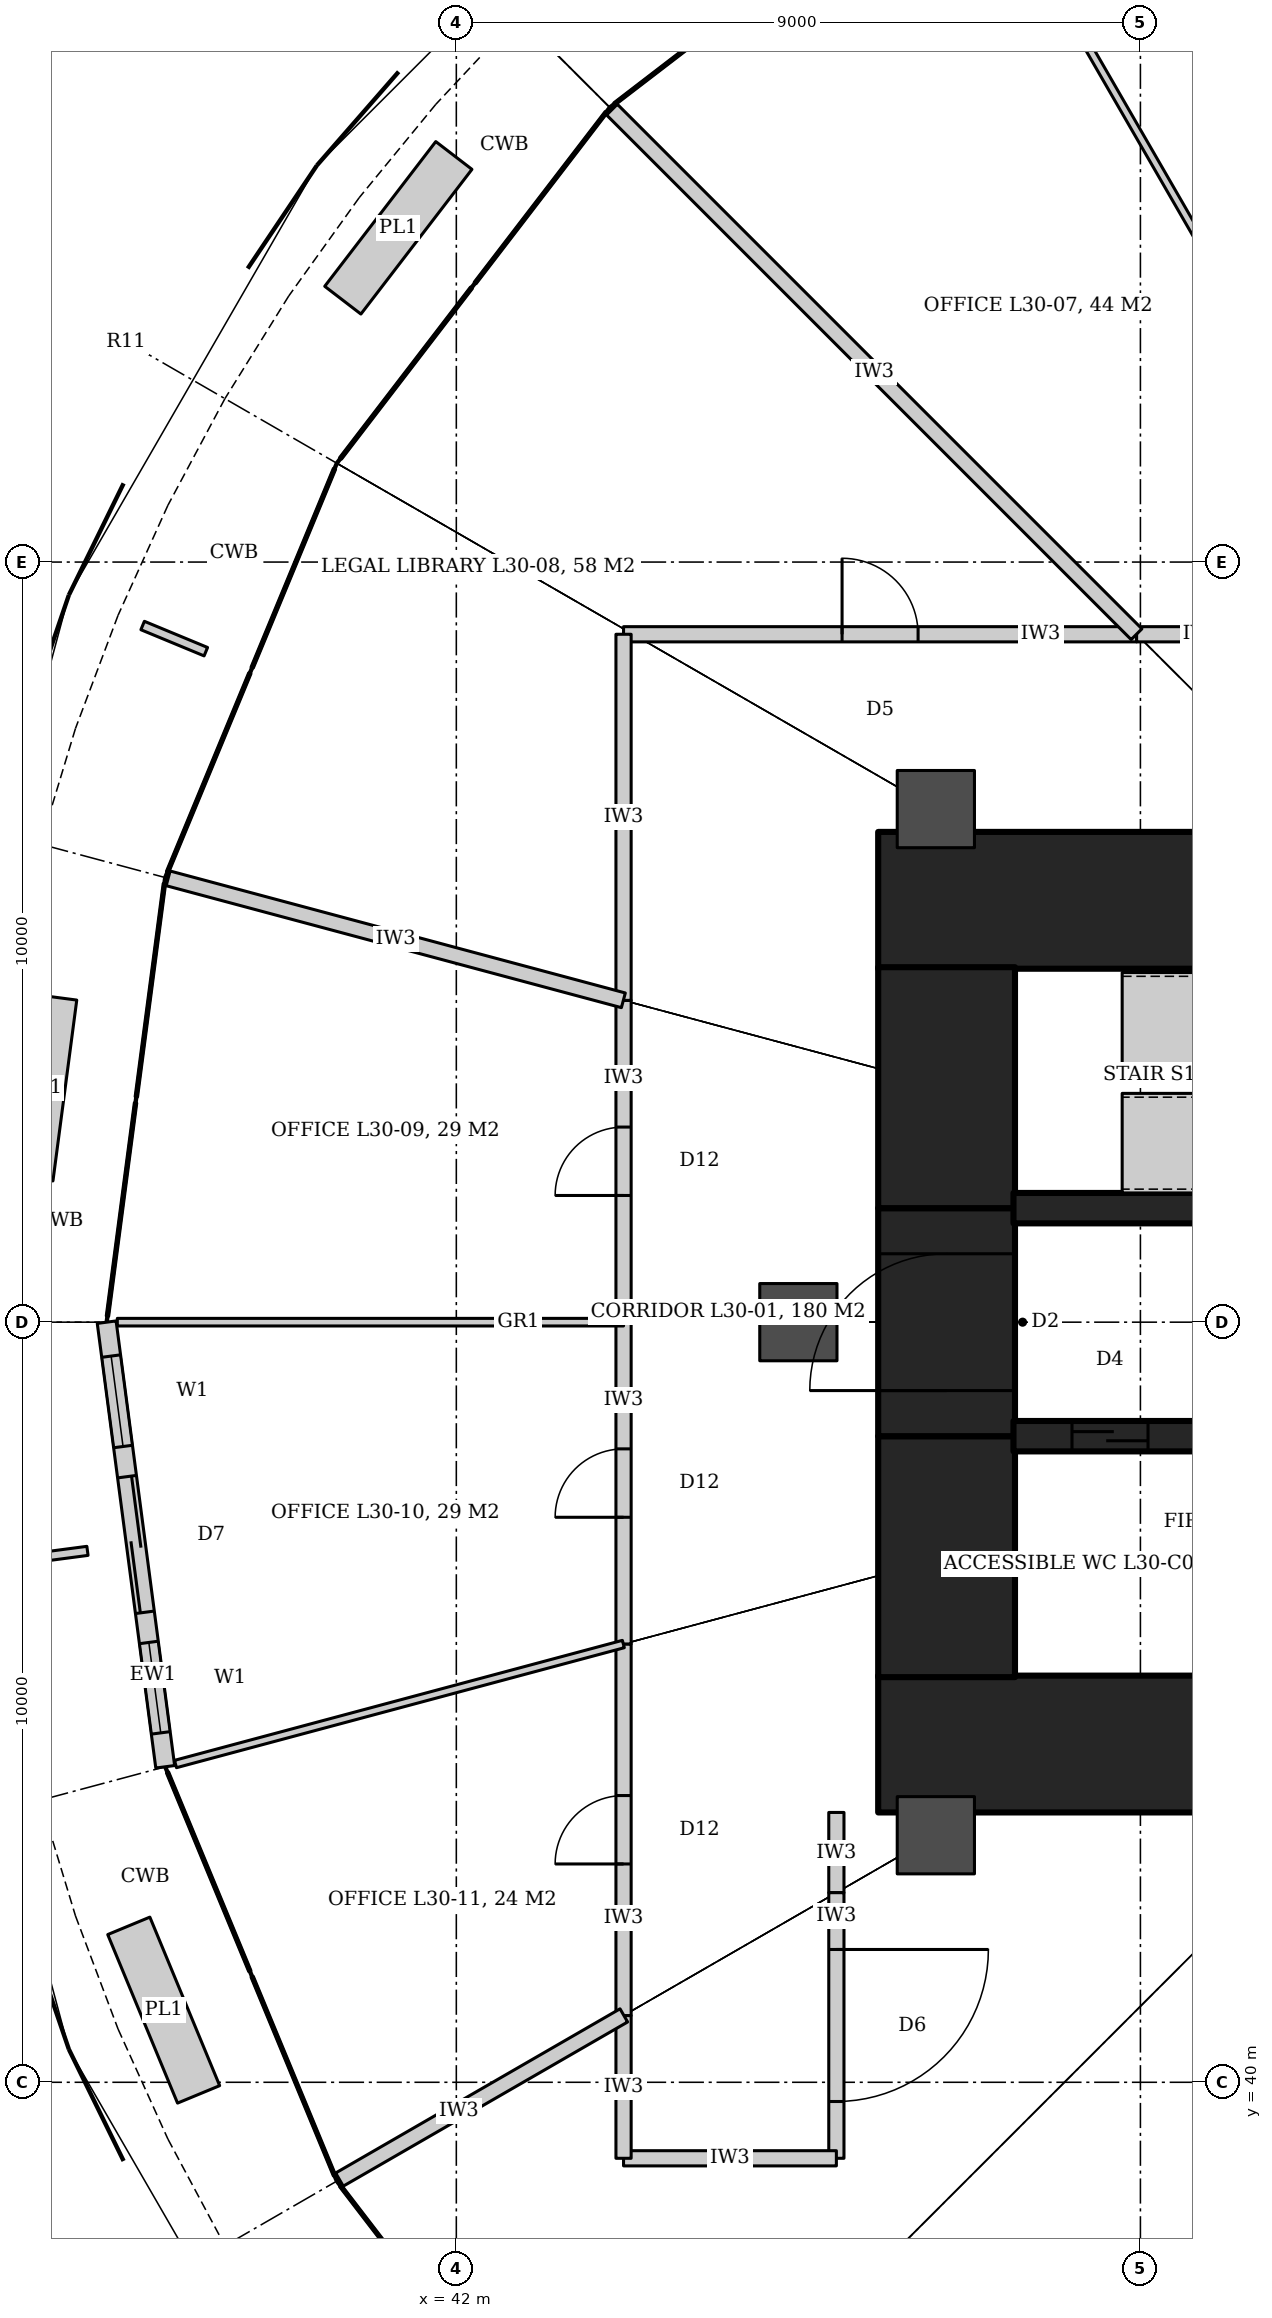
"""IFC4 building model, lengths in metres.
Left out: names, types, materials, properties, quantities, classifications, styles, units other than length and angle.
Written with IfcOpenShell. Run it as: python <this file> out.ifc"""

import sys

from ifc_helpers import new_model, si_unit, direction, frame, frame_2d, origin, origin_2d, place, context, subcontext, project, spatial, rectangle, hollow_circle, extrude, element, fill, save


model = new_model("IFC4")
c1 = context("Model", 3, precision=1e-05, world=origin(), true_north=direction((0.0, 1.0)))
c2 = subcontext(c1, "Body", "Model", "MODEL_VIEW")
j1 = project(units=[si_unit("LENGTHUNIT", "METRE"), si_unit("PLANEANGLEUNIT", "RADIAN")], contexts=[c1])
p1 = place(None, origin())
s1 = spatial("IfcSite", under=j1, at=p1, CompositionType="ELEMENT")
p2 = place(p1, origin())
s2 = spatial("IfcBuilding", under=s1, at=p2, CompositionType="ELEMENT")
p3 = place(p2, frame((0.0, 0.0, 135.2)))
s3 = spatial("IfcBuildingStorey", under=s2, at=p3, CompositionType="ELEMENT", Elevation=135.2)
for number, where, z_axis, x_axis in (
    (1, (47.55, 55.55, 0.0), (0.0, 0.0, 1.0), (1.0, 0.0, 0.0)),
    (2, (47.55, 44.45, 0.0), (0.0, 0.0, 1.0), (1.0, 0.0, 0.0)),
):
    element("IfcWall", number, at=place(p3, frame(where, z_axis=z_axis, x_axis=x_axis)), inside=s3, PredefinedType="SHEAR", context=c2, shape_type="SweptSolid", body=[
        extrude(rectangle(XDim=7.85, YDim=1.8, at=frame_2d((3.925, 0.0))), origin(), (0.0, 0.0, 1.0), 4.2),
    ])
p4 = place(p3, frame((48.45, 45.33, 0.0), z_axis=(0.0, 0.0, 1.0), x_axis=(0.0, 1.0, 0.0)))
e3 = element("IfcWall", 3, at=p4, inside=s3, PredefinedType="SHEAR", context=c2, shape_type="SweptSolid", body=[
    extrude(rectangle(XDim=3.17, YDim=1.8, at=frame_2d((1.585, 0.0))), origin(), (0.0, 0.0, 1.0), 4.2),
])
p5 = place(p3, frame((48.45, 48.5, 0.0), z_axis=(0.0, 0.0, 1.0), x_axis=(0.0, 1.0, 0.0)))
e4 = element("IfcWall", 4, at=p5, inside=s3, PredefinedType="SHEAR", context=c2, shape_type="SweptSolid", body=[
    extrude(rectangle(XDim=3.0, YDim=1.8, at=frame_2d((1.5, 0.0))), origin(), (0.0, 0.0, 1.0), 4.2),
])
p6 = place(p5, frame((0.6, 0.0, 0.0)))
e5 = element("IfcOpeningElement", 5, at=p6, cuts=e4, PredefinedType="OPENING", context=c2, shape_type="SweptSolid", body=[
    extrude(rectangle(XDim=1.8, YDim=2.1, at=frame_2d((0.9, 1.05))), frame((0.0, 0.91, 0.0), z_axis=(0.0, -1.0, 0.0), x_axis=(1.0, 0.0, 0.0)), (0.0, 0.0, 1.0), 1.82),
])
p7 = place(p3, frame((48.45, 51.5, 0.0), z_axis=(0.0, 0.0, 1.0), x_axis=(0.0, 1.0, 0.0)))
e6 = element("IfcWall", 6, at=p7, inside=s3, PredefinedType="SHEAR", context=c2, shape_type="SweptSolid", body=[
    extrude(rectangle(XDim=3.17, YDim=1.8, at=frame_2d((1.585, 0.0))), origin(), (0.0, 0.0, 1.0), 4.2),
])
p8 = place(p3, frame((49.33, 51.5, 0.0), z_axis=(0.0, 0.0, 1.0), x_axis=(1.0, 0.0, 0.0)))
e7 = element("IfcWall", 7, at=p8, inside=s3, PredefinedType="SHEAR", context=c2, shape_type="SweptSolid", body=[
    extrude(rectangle(XDim=6.07, YDim=0.4, at=frame_2d((3.035, 0.0))), origin(), (0.0, 0.0, 1.0), 4.2),
])
p9 = place(p8, frame((4.57, 0.0, 0.0)))
e8 = element("IfcOpeningElement", 8, at=p9, cuts=e7, PredefinedType="OPENING", context=c2, shape_type="SweptSolid", body=[
    extrude(rectangle(XDim=1.0, YDim=2.1, at=frame_2d((0.5, 1.05))), frame((0.0, 0.21, 0.0), z_axis=(0.0, -1.0, 0.0), x_axis=(1.0, 0.0, 0.0)), (0.0, 0.0, 1.0), 0.42),
])
p10 = place(p3, frame((49.33, 48.5, 0.0), z_axis=(0.0, 0.0, 1.0), x_axis=(1.0, 0.0, 0.0)))
e9 = element("IfcWall", 9, at=p10, inside=s3, PredefinedType="SHEAR", context=c2, shape_type="SweptSolid", body=[
    extrude(rectangle(XDim=6.07, YDim=0.4, at=frame_2d((3.035, 0.0))), origin(), (0.0, 0.0, 1.0), 4.2),
])
p11 = place(p10, frame((0.77, 0.0, 0.0)))
e10 = element("IfcOpeningElement", 10, at=p11, cuts=e9, PredefinedType="OPENING", context=c2, shape_type="SweptSolid", body=[
    extrude(rectangle(XDim=1.0, YDim=2.1, at=frame_2d((0.5, 1.05))), frame((0.0, 0.21, 0.0), z_axis=(0.0, -1.0, 0.0), x_axis=(1.0, 0.0, 0.0)), (0.0, 0.0, 1.0), 0.42),
])
p12 = place(p10, frame((2.87, 0.0, 0.0)))
e11 = element("IfcOpeningElement", 11, at=p12, cuts=e9, PredefinedType="OPENING", context=c2, shape_type="SweptSolid", body=[
    extrude(rectangle(XDim=0.9, YDim=2.1, at=frame_2d((0.45, 1.05))), frame((0.0, 0.21, 0.0), z_axis=(0.0, -1.0, 0.0), x_axis=(1.0, 0.0, 0.0)), (0.0, 0.0, 1.0), 0.42),
])
p13 = place(p10, frame((4.57, 0.0, 0.0)))
e12 = element("IfcOpeningElement", 12, at=p13, cuts=e9, PredefinedType="OPENING", context=c2, shape_type="SweptSolid", body=[
    extrude(rectangle(XDim=0.9, YDim=2.1, at=frame_2d((0.45, 1.05))), frame((0.0, 0.21, 0.0), z_axis=(0.0, -1.0, 0.0), x_axis=(1.0, 0.0, 0.0)), (0.0, 0.0, 1.0), 0.42),
])
for number, where, z_axis, x_axis in (
    (13, (48.309, 56.75, 0.0), (0.0, 0.0, 1.0), (1.0, 0.0, 0.0)),
    (14, (46.5, 50.0, 0.0), (0.0, 0.0, 1.0), (1.0, 0.0, 0.0)),
    (15, (48.309, 43.25, 0.0), (0.0, 0.0, 1.0), (1.0, 0.0, 0.0)),
):
    element("IfcColumn", number, at=place(p3, frame(where, z_axis=z_axis, x_axis=x_axis)), inside=s3, PredefinedType="COLUMN", context=c2, shape_type="SweptSolid", body=[
        extrude(hollow_circle(Radius=0.508, WallThickness=0.05, at=origin_2d()), origin(), (0.0, 0.0, 1.0), 4.2),
    ])
p14 = place(p3, frame((44.2, 59.05, 0.0), z_axis=(0.0, 0.0, 1.0), x_axis=(1.0, 0.0, 0.0)))
e16 = element("IfcWall", 16, at=p14, inside=s3, PredefinedType="PARTITIONING", context=c2, shape_type="SweptSolid", body=[
    extrude(rectangle(XDim=6.75, YDim=0.2, at=frame_2d((3.375, 0.0))), origin(), (0.0, 0.0, 1.0), 3.02),
])
p15 = place(p14, frame((2.875, 0.0, 0.0)))
e17 = element("IfcOpeningElement", 17, at=p15, cuts=e16, PredefinedType="OPENING", context=c2, shape_type="SweptSolid", body=[
    extrude(rectangle(XDim=1.0, YDim=2.1, at=frame_2d((0.5, 1.05))), frame((0.0, 0.11, 0.0), z_axis=(0.0, -1.0, 0.0), x_axis=(1.0, 0.0, 0.0)), (0.0, 0.0, 1.0), 0.22),
])
p16 = place(p3, frame((50.95, 59.05, 0.0), z_axis=(0.0, 0.0, 1.0), x_axis=(1.0, 0.0, 0.0)))
e18 = element("IfcWall", 18, at=p16, inside=s3, PredefinedType="PARTITIONING", context=c2, shape_type="SweptSolid", body=[
    extrude(rectangle(XDim=3.825, YDim=0.2, at=frame_2d((1.913, 0.0))), origin(), (0.0, 0.0, 1.0), 3.02),
])
p17 = place(p16, frame((1.462, 0.0, 0.0)))
e19 = element("IfcOpeningElement", 19, at=p17, cuts=e18, PredefinedType="OPENING", context=c2, shape_type="SweptSolid", body=[
    extrude(rectangle(XDim=0.9, YDim=2.4, at=frame_2d((0.45, 1.2))), frame((0.0, 0.11, 0.0), z_axis=(0.0, -1.0, 0.0), x_axis=(1.0, 0.0, 0.0)), (0.0, 0.0, 1.0), 0.22),
])
p18 = place(p3, frame((47.0, 43.55, 0.0), z_axis=(0.0, 0.0, 1.0), x_axis=(0.0, -1.0, 0.0)))
e20 = element("IfcWall", 20, at=p18, inside=s3, PredefinedType="PARTITIONING", context=c2, shape_type="SweptSolid", body=[
    extrude(rectangle(XDim=1.056, YDim=0.2, at=frame_2d((0.528, 0.0))), origin(), (0.0, 0.0, 1.0), 3.04),
])
p19 = place(p3, frame((47.0, 42.494, 0.0), z_axis=(0.0, 0.0, 1.0), x_axis=(0.0, -1.0, 0.0)))
e21 = element("IfcWall", 21, at=p19, inside=s3, PredefinedType="PARTITIONING", context=c2, shape_type="SweptSolid", body=[
    extrude(rectangle(XDim=3.494, YDim=0.2, at=frame_2d((1.747, 0.0))), origin(), (0.0, 0.0, 1.0), 3.04),
])
p20 = place(p19, frame((0.747, 0.0, 0.0)))
e22 = element("IfcOpeningElement", 22, at=p20, cuts=e21, PredefinedType="OPENING", context=c2, shape_type="SweptSolid", body=[
    extrude(rectangle(XDim=2.0, YDim=2.1, at=frame_2d((1.0, 1.05))), frame((0.0, 0.11, 0.0), z_axis=(0.0, -1.0, 0.0), x_axis=(1.0, 0.0, 0.0)), (0.0, 0.0, 1.0), 0.22),
])
p21 = place(p3, frame((47.0, 39.0, 0.0), z_axis=(0.0, 0.0, 1.0), x_axis=(-1.0, 0.0, 0.0)))
e23 = element("IfcWall", 23, at=p21, inside=s3, PredefinedType="PARTITIONING", context=c2, shape_type="SweptSolid", body=[
    extrude(rectangle(XDim=2.8, YDim=0.2, at=frame_2d((1.4, 0.0))), origin(), (0.0, 0.0, 1.0), 3.04),
])
p22 = place(p3, frame((44.2, 39.0, 0.0), z_axis=(0.0, 0.0, 1.0), x_axis=(0.0, 1.0, 0.0)))
e24 = element("IfcWall", 24, at=p22, inside=s3, PredefinedType="PARTITIONING", context=c2, shape_type="SweptSolid", body=[
    extrude(rectangle(XDim=1.878, YDim=0.2, at=frame_2d((0.939, 0.0))), origin(), (0.0, 0.0, 1.0), 3.04),
])
p23 = place(p3, frame((44.2, 40.878, 0.0), z_axis=(0.0, 0.0, 1.0), x_axis=(0.0, 1.0, 0.0)))
e25 = element("IfcWall", 25, at=p23, inside=s3, PredefinedType="PARTITIONING", context=c2, shape_type="SweptSolid", body=[
    extrude(rectangle(XDim=4.888, YDim=0.2, at=frame_2d((2.444, 0.0))), origin(), (0.0, 0.0, 1.0), 3.04),
])
p24 = place(p23, frame((1.994, 0.0, 0.0)))
e26 = element("IfcOpeningElement", 26, at=p24, cuts=e25, PredefinedType="OPENING", context=c2, shape_type="SweptSolid", body=[
    extrude(rectangle(XDim=0.9, YDim=2.4, at=frame_2d((0.45, 1.2))), frame((0.0, 0.11, 0.0), z_axis=(0.0, -1.0, 0.0), x_axis=(1.0, 0.0, 0.0)), (0.0, 0.0, 1.0), 0.22),
])
p25 = place(p3, frame((44.2, 45.766, 0.0), z_axis=(0.0, 0.0, 1.0), x_axis=(0.0, 1.0, 0.0)))
e27 = element("IfcWall", 27, at=p25, inside=s3, PredefinedType="PARTITIONING", context=c2, shape_type="SweptSolid", body=[
    extrude(rectangle(XDim=4.234, YDim=0.2, at=frame_2d((2.117, 0.0))), origin(), (0.0, 0.0, 1.0), 3.04),
])
p26 = place(p25, frame((1.667, 0.0, 0.0)))
e28 = element("IfcOpeningElement", 28, at=p26, cuts=e27, PredefinedType="OPENING", context=c2, shape_type="SweptSolid", body=[
    extrude(rectangle(XDim=0.9, YDim=2.4, at=frame_2d((0.45, 1.2))), frame((0.0, 0.11, 0.0), z_axis=(0.0, -1.0, 0.0), x_axis=(1.0, 0.0, 0.0)), (0.0, 0.0, 1.0), 0.22),
])
p27 = place(p3, frame((44.2, 50.0, 0.0), z_axis=(0.0, 0.0, 1.0), x_axis=(0.0, 1.0, 0.0)))
e29 = element("IfcWall", 29, at=p27, inside=s3, PredefinedType="PARTITIONING", context=c2, shape_type="SweptSolid", body=[
    extrude(rectangle(XDim=4.234, YDim=0.2, at=frame_2d((2.117, 0.0))), origin(), (0.0, 0.0, 1.0), 3.04),
])
p28 = place(p27, frame((1.667, 0.0, 0.0)))
e30 = element("IfcOpeningElement", 30, at=p28, cuts=e29, PredefinedType="OPENING", context=c2, shape_type="SweptSolid", body=[
    extrude(rectangle(XDim=0.9, YDim=2.4, at=frame_2d((0.45, 1.2))), frame((0.0, 0.11, 0.0), z_axis=(0.0, -1.0, 0.0), x_axis=(1.0, 0.0, 0.0)), (0.0, 0.0, 1.0), 0.22),
])
p29 = place(p3, frame((44.2, 54.234, 0.0), z_axis=(0.0, 0.0, 1.0), x_axis=(0.0, 1.0, 0.0)))
e31 = element("IfcWall", 31, at=p29, inside=s3, PredefinedType="PARTITIONING", context=c2, shape_type="SweptSolid", body=[
    extrude(rectangle(XDim=4.816, YDim=0.2, at=frame_2d((2.408, 0.0))), origin(), (0.0, 0.0, 1.0), 3.04),
])
p30 = place(p3, frame((52.916, 62.27, 0.0), z_axis=(0.0, 0.0, 1.0), x_axis=(-0.499996941814, 0.866027169422, 0.0)))
e32 = element("IfcWall", 32, at=p30, inside=s3, PredefinedType="PARTITIONING", context=c2, shape_type="SweptSolid", body=[
    extrude(rectangle(XDim=8.392, YDim=0.1, at=frame_2d((4.196, 0.0))), origin(), (0.0, 0.0, 1.0), 3.04),
])
p31 = place(p3, frame((50.949, 59.051, 0.0), z_axis=(0.0, 0.0, 1.0), x_axis=(-0.707106781187, 0.707106781187, 0.0)))
e33 = element("IfcWall", 33, at=p31, inside=s3, PredefinedType="PARTITIONING", context=c2, shape_type="SweptSolid", body=[
    extrude(rectangle(XDim=9.76, YDim=0.2, at=frame_2d((4.88, 0.0))), origin(), (0.0, 0.0, 1.0), 3.02),
])
p32 = place(p3, frame((44.198, 54.234, 0.0), z_axis=(0.0, 0.0, 1.0), x_axis=(-0.965923795283, 0.258826624802, 0.0)))
e34 = element("IfcWall", 34, at=p32, inside=s3, PredefinedType="PARTITIONING", context=c2, shape_type="SweptSolid", body=[
    extrude(rectangle(XDim=6.2, YDim=0.2, at=frame_2d((3.1, 0.0))), origin(), (0.0, 0.0, 1.0), 3.04),
])
p33 = place(p3, frame((44.2, 50.0, 0.0), z_axis=(0.0, 0.0, 1.0), x_axis=(-1.0, 0.0, 0.0)))
e35 = element("IfcWall", 35, at=p33, inside=s3, PredefinedType="PARTITIONING", context=c2, shape_type="SweptSolid", body=[
    extrude(rectangle(XDim=6.66, YDim=0.1, at=frame_2d((3.33, 0.0))), origin(), (0.0, 0.0, 1.0), 3.04),
])
p34 = place(p3, frame((44.198, 45.766, 0.0), z_axis=(0.0, 0.0, 1.0), x_axis=(-0.965932688119, -0.258793435045, 0.0)))
e36 = element("IfcWall", 36, at=p34, inside=s3, PredefinedType="PARTITIONING", context=c2, shape_type="SweptSolid", body=[
    extrude(rectangle(XDim=6.1, YDim=0.1, at=frame_2d((3.05, 0.0))), origin(), (0.0, 0.0, 1.0), 3.04),
])
p35 = place(p3, frame((44.204, 40.88, 0.0), z_axis=(0.0, 0.0, 1.0), x_axis=(-0.866033125095, -0.499986626058, 0.0)))
e37 = element("IfcWall", 37, at=p35, inside=s3, PredefinedType="PARTITIONING", context=c2, shape_type="SweptSolid", body=[
    extrude(rectangle(XDim=4.32, YDim=0.2, at=frame_2d((2.16, 0.0))), origin(), (0.0, 0.0, 1.0), 3.04),
])
p36 = place(p3, frame((37.4, 50.0, 0.0), z_axis=(0.0, 0.0, 1.0), x_axis=(0.130556203128, -0.991440909901, 0.0)))
e38 = element("IfcWall", 38, at=p36, inside=s3, PredefinedType="SOLIDWALL", context=c2, shape_type="SweptSolid", body=[
    extrude(rectangle(XDim=5.9, YDim=0.25, at=frame_2d((2.95, 0.0))), origin(), (0.0, 0.0, 1.0), 4.04),
])
p37 = place(p36, frame((2.05, 0.0, 0.0)))
e39 = element("IfcOpeningElement", 39, at=p37, cuts=e38, PredefinedType="OPENING", context=c2, shape_type="SweptSolid", body=[
    extrude(rectangle(XDim=1.8, YDim=2.4, at=frame_2d((0.9, 1.2))), frame((0.0, 0.135, 0.0), z_axis=(0.0, -1.0, 0.0), x_axis=(1.0, 0.0, 0.0)), (0.0, 0.0, 1.0), 0.27),
])
p38 = place(p36, frame((0.45, 0.0, 0.0)))
e40 = element("IfcOpeningElement", 40, at=p38, cuts=e38, PredefinedType="OPENING", context=c2, shape_type="SweptSolid", body=[
    extrude(rectangle(XDim=1.2, YDim=2.4, at=frame_2d((0.6, 1.2))), frame((0.0, 0.135, 0.0), z_axis=(0.0, -1.0, 0.0), x_axis=(1.0, 0.0, 0.0)), (0.0, 0.0, 1.0), 0.27),
])
p39 = place(p36, frame((4.25, 0.0, 0.0)))
e41 = element("IfcOpeningElement", 41, at=p39, cuts=e38, PredefinedType="OPENING", context=c2, shape_type="SweptSolid", body=[
    extrude(rectangle(XDim=1.2, YDim=2.4, at=frame_2d((0.6, 1.2))), frame((0.0, 0.135, 0.0), z_axis=(0.0, -1.0, 0.0), x_axis=(1.0, 0.0, 0.0)), (0.0, 0.0, 1.0), 0.27),
])
p40 = place(p15, origin())
e42 = element("IfcDoor", 42, at=p40, inside=s3, OperationType="SINGLE_SWING_LEFT", PredefinedType="DOOR", context=c2, shape_type="SweptSolid", body=[
    extrude(rectangle(XDim=1.0, YDim=2.1, at=frame_2d((0.5, 1.05))), frame((0.0, 0.025, 0.0), z_axis=(0.0, -1.0, 0.0), x_axis=(1.0, 0.0, 0.0)), (0.0, 0.0, 1.0), 0.05),
])
fill(e17, e42)
p41 = place(p28, origin())
e43 = element("IfcDoor", 43, at=p41, inside=s3, OperationType="SINGLE_SWING_LEFT", PredefinedType="DOOR", context=c2, shape_type="SweptSolid", body=[
    extrude(rectangle(XDim=0.9, YDim=2.4, at=frame_2d((0.45, 1.2))), frame((0.0, 0.025, 0.0), z_axis=(0.0, -1.0, 0.0), x_axis=(1.0, 0.0, 0.0)), (0.0, 0.0, 1.0), 0.05),
])
fill(e30, e43)
p42 = place(p26, origin())
e44 = element("IfcDoor", 44, at=p42, inside=s3, OperationType="SINGLE_SWING_LEFT", PredefinedType="DOOR", context=c2, shape_type="SweptSolid", body=[
    extrude(rectangle(XDim=0.9, YDim=2.4, at=frame_2d((0.45, 1.2))), frame((0.0, 0.025, 0.0), z_axis=(0.0, -1.0, 0.0), x_axis=(1.0, 0.0, 0.0)), (0.0, 0.0, 1.0), 0.05),
])
fill(e28, e44)
p43 = place(p24, origin())
e45 = element("IfcDoor", 45, at=p43, inside=s3, OperationType="SINGLE_SWING_LEFT", PredefinedType="DOOR", context=c2, shape_type="SweptSolid", body=[
    extrude(rectangle(XDim=0.9, YDim=2.4, at=frame_2d((0.45, 1.2))), frame((0.0, 0.025, 0.0), z_axis=(0.0, -1.0, 0.0), x_axis=(1.0, 0.0, 0.0)), (0.0, 0.0, 1.0), 0.05),
])
fill(e26, e45)
p44 = place(p20, origin())
e46 = element("IfcDoor", 46, at=p44, inside=s3, OperationType="DOUBLE_DOOR_DOUBLE_SWING", PredefinedType="DOOR", context=c2, shape_type="SweptSolid", body=[
    extrude(rectangle(XDim=2.0, YDim=2.1, at=frame_2d((1.0, 1.05))), frame((0.0, 0.025, 0.0), z_axis=(0.0, -1.0, 0.0), x_axis=(1.0, 0.0, 0.0)), (0.0, 0.0, 1.0), 0.05),
])
fill(e22, e46)
p45 = place(p37, origin())
e47 = element("IfcDoor", 47, at=p45, inside=s3, OperationType="DOUBLE_DOOR_SLIDING", PredefinedType="DOOR", context=c2, shape_type="SweptSolid", body=[
    extrude(rectangle(XDim=1.8, YDim=2.4, at=frame_2d((0.9, 1.2))), frame((0.0, 0.025, 0.0), z_axis=(0.0, -1.0, 0.0), x_axis=(1.0, 0.0, 0.0)), (0.0, 0.0, 1.0), 0.05),
])
fill(e39, e47)
p46 = place(p38, origin())
e48 = element("IfcWindow", 48, at=p46, inside=s3, PartitioningType="SINGLE_PANEL", PredefinedType="WINDOW", context=c2, shape_type="SweptSolid", body=[
    extrude(rectangle(XDim=1.2, YDim=2.4, at=frame_2d((0.6, 1.2))), frame((0.0, 0.03, 0.0), z_axis=(0.0, -1.0, 0.0), x_axis=(1.0, 0.0, 0.0)), (0.0, 0.0, 1.0), 0.06),
])
fill(e40, e48)
p47 = place(p39, origin())
e49 = element("IfcWindow", 49, at=p47, inside=s3, PartitioningType="SINGLE_PANEL", PredefinedType="WINDOW", context=c2, shape_type="SweptSolid", body=[
    extrude(rectangle(XDim=1.2, YDim=2.4, at=frame_2d((0.6, 1.2))), frame((0.0, 0.03, 0.0), z_axis=(0.0, -1.0, 0.0), x_axis=(1.0, 0.0, 0.0)), (0.0, 0.0, 1.0), 0.06),
])
fill(e41, e49)
p48 = place(p11, origin())
e50 = element("IfcDoor", 50, at=p48, inside=s3, OperationType="SLIDING_TO_LEFT", PredefinedType="DOOR", context=c2, shape_type="SweptSolid", body=[
    extrude(rectangle(XDim=1.0, YDim=2.1, at=frame_2d((0.5, 1.05))), frame((0.0, 0.025, 0.0), z_axis=(0.0, -1.0, 0.0), x_axis=(1.0, 0.0, 0.0)), (0.0, 0.0, 1.0), 0.05),
])
fill(e10, e50)
p49 = place(p6, origin())
e51 = element("IfcDoor", 51, at=p49, inside=s3, OperationType="DOUBLE_DOOR_DOUBLE_SWING", PredefinedType="DOOR", context=c2, shape_type="SweptSolid", body=[
    extrude(rectangle(XDim=1.8, YDim=2.1, at=frame_2d((0.9, 1.05))), frame((0.0, 0.025, 0.0), z_axis=(0.0, -1.0, 0.0), x_axis=(1.0, 0.0, 0.0)), (0.0, 0.0, 1.0), 0.05),
])
fill(e5, e51)
save(model, sys.argv[1])
